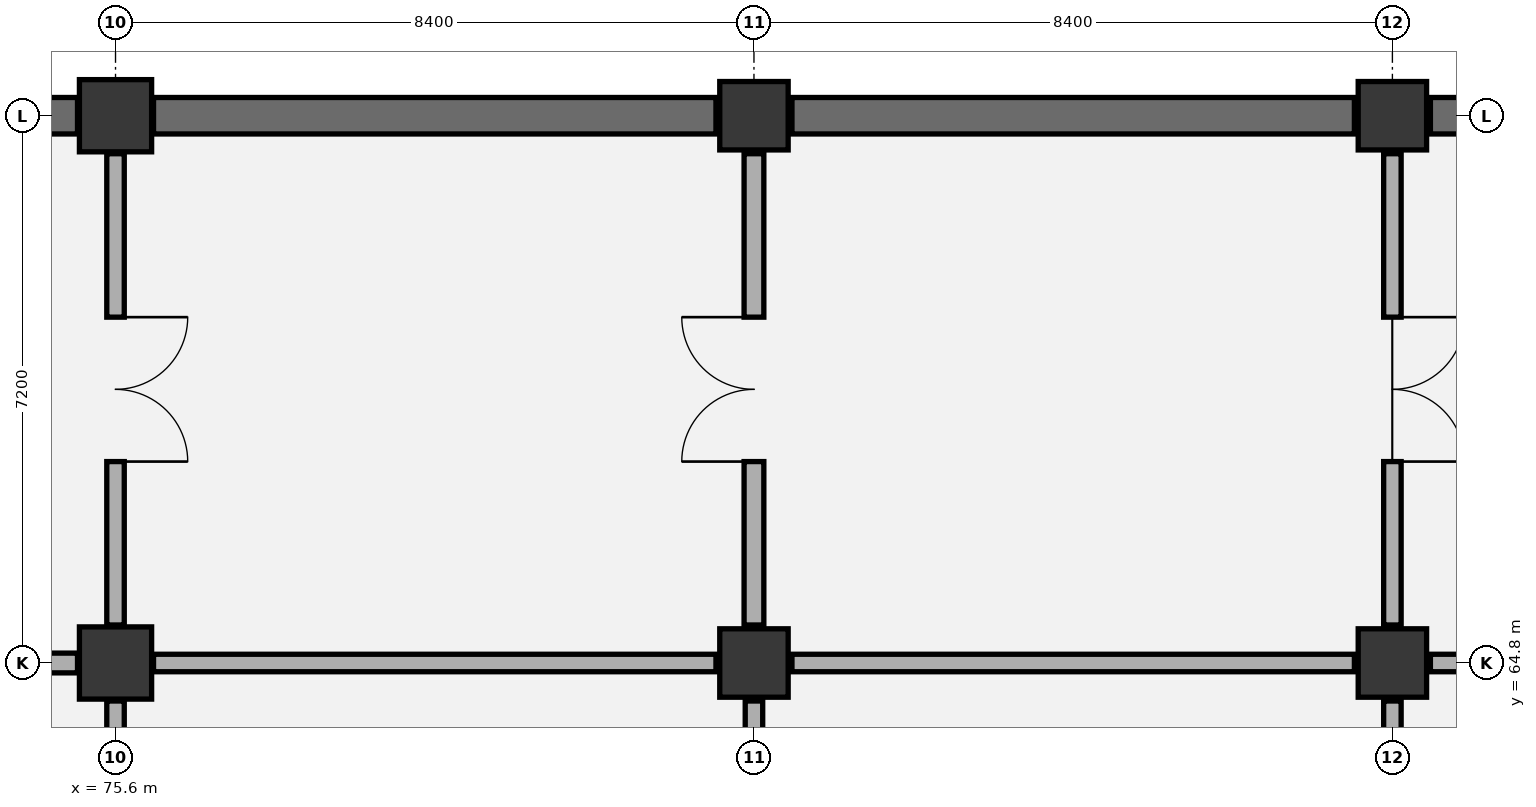
"""IFC4 building model, lengths in metres.
Left out: names, types, materials, properties, quantities, classifications, styles, units other than length and angle.
Written with IfcOpenShell. Run it as: python <this file> out.ifc"""

import sys

from ifc_helpers import new_model, si_unit, direction, frame, frame_2d, origin, origin_2d, place, context, subcontext, project, spatial, rectangle, extrude, element, fill, save


model = new_model("IFC4")
c1 = context("Model", 3, precision=1e-05, world=origin(), true_north=direction((0.0, 1.0)))
c2 = subcontext(c1, "Body", "Model", "MODEL_VIEW")
j1 = project(units=[si_unit("LENGTHUNIT", "METRE"), si_unit("PLANEANGLEUNIT", "RADIAN")], contexts=[c1])
p1 = place(None, origin())
s1 = spatial("IfcSite", under=j1, at=p1, CompositionType="ELEMENT")
p2 = place(p1, origin())
s2 = spatial("IfcBuilding", under=s1, at=p2, CompositionType="ELEMENT")
p3 = place(p2, frame((0.0, 0.0, -4.8)))
s3 = spatial("IfcBuildingStorey", under=s2, at=p3, CompositionType="ELEMENT", Elevation=-4.8)
for number, where, z_axis, x_axis in (
    (1, (75.6, 64.8, 0.0), (0.0, 0.0, 1.0), (1.0, 0.0, 0.0)),
    (2, (75.6, 72.0, 0.0), (0.0, 0.0, 1.0), (1.0, 0.0, 0.0)),
):
    element("IfcColumn", number, at=place(p3, frame(where, z_axis=z_axis, x_axis=x_axis)), inside=s3, PredefinedType="COLUMN", context=c2, shape_type="SweptSolid", body=[
        extrude(rectangle(XDim=0.95, YDim=0.95, at=origin_2d()), origin(), (0.0, 0.0, 1.0), 4.8),
    ])
for number, where, z_axis, x_axis in (
    (3, (84.0, 64.8, 0.0), (0.0, 0.0, 1.0), (1.0, 0.0, 0.0)),
    (4, (84.0, 72.0, 0.0), (0.0, 0.0, 1.0), (1.0, 0.0, 0.0)),
    (5, (92.4, 64.8, 0.0), (0.0, 0.0, 1.0), (1.0, 0.0, 0.0)),
    (6, (92.4, 72.0, 0.0), (0.0, 0.0, 1.0), (1.0, 0.0, 0.0)),
):
    element("IfcColumn", number, at=place(p3, frame(where, z_axis=z_axis, x_axis=x_axis)), inside=s3, PredefinedType="COLUMN", context=c2, shape_type="SweptSolid", body=[
        extrude(rectangle(XDim=0.9, YDim=0.9, at=origin_2d()), origin(), (0.0, 0.0, 1.0), 4.8),
    ])
p4 = place(p3, frame((67.7, 72.0, 0.0), z_axis=(0.0, 0.0, 1.0), x_axis=(1.0, 0.0, 0.0)))
e7 = element("IfcWall", 7, at=p4, inside=s3, PredefinedType="USERDEFINED", context=c2, shape_type="SweptSolid", body=[
    extrude(rectangle(XDim=7.4, YDim=0.48, at=frame_2d((3.7, 0.0))), origin(), (0.0, 0.0, 1.0), 4.45),
])
for number, where, z_axis, x_axis in (
    (8, (76.1, 72.0, 0.0), (0.0, 0.0, 1.0), (1.0, 0.0, 0.0)),
    (9, (84.5, 72.0, 0.0), (0.0, 0.0, 1.0), (1.0, 0.0, 0.0)),
):
    element("IfcWall", number, at=place(p3, frame(where, z_axis=z_axis, x_axis=x_axis)), inside=s3, PredefinedType="USERDEFINED", context=c2, shape_type="SweptSolid", body=[
        extrude(rectangle(XDim=7.4, YDim=0.48, at=frame_2d((3.7, 0.0))), origin(), (0.0, 0.0, 1.0), 4.45),
    ])
p5 = place(p3, frame((92.9, 72.0, 0.0), z_axis=(0.0, 0.0, 1.0), x_axis=(1.0, 0.0, 0.0)))
e10 = element("IfcWall", 10, at=p5, inside=s3, PredefinedType="USERDEFINED", context=c2, shape_type="SweptSolid", body=[
    extrude(rectangle(XDim=7.4, YDim=0.48, at=frame_2d((3.7, 0.0))), origin(), (0.0, 0.0, 1.0), 4.45),
])
p6 = place(p3, frame((75.6, 58.1, 0.0), z_axis=(0.0, 0.0, 1.0), x_axis=(0.0, 1.0, 0.0)))
e11 = element("IfcWall", 11, at=p6, inside=s3, PredefinedType="PARTITIONING", context=c2, shape_type="SweptSolid", body=[
    extrude(rectangle(XDim=6.2, YDim=0.23, at=frame_2d((3.1, 0.0))), origin(), (0.0, 0.0, 1.0), 3.645),
])
p7 = place(p3, frame((67.7, 64.8, 0.0), z_axis=(0.0, 0.0, 1.0), x_axis=(1.0, 0.0, 0.0)))
e12 = element("IfcWall", 12, at=p7, inside=s3, PredefinedType="PARTITIONING", context=c2, shape_type="SweptSolid", body=[
    extrude(rectangle(XDim=7.4, YDim=0.26, at=frame_2d((3.7, 0.0))), origin(), (0.0, 0.0, 1.0), 3.545),
])
p8 = place(p3, frame((75.6, 65.3, 0.0), z_axis=(0.0, 0.0, 1.0), x_axis=(0.0, 1.0, 0.0)))
e13 = element("IfcWall", 13, at=p8, inside=s3, PredefinedType="PARTITIONING", context=c2, shape_type="SweptSolid", body=[
    extrude(rectangle(XDim=6.2, YDim=0.23, at=frame_2d((3.1, 0.0))), origin(), (0.0, 0.0, 1.0), 3.645),
])
p9 = place(p8, frame((2.15, 0.0, 0.0)))
e14 = element("IfcOpeningElement", 14, at=p9, cuts=e13, PredefinedType="OPENING", context=c2, shape_type="SweptSolid", body=[
    extrude(rectangle(XDim=1.9, YDim=2.3, at=frame_2d((0.95, 1.15))), frame((0.0, 0.125, 0.0), z_axis=(0.0, -1.0, 0.0), x_axis=(1.0, 0.0, 0.0)), (0.0, 0.0, 1.0), 0.25),
])
p10 = place(p3, frame((84.0, 58.1, 0.0), z_axis=(0.0, 0.0, 1.0), x_axis=(0.0, 1.0, 0.0)))
e15 = element("IfcWall", 15, at=p10, inside=s3, PredefinedType="PARTITIONING", context=c2, shape_type="SweptSolid", body=[
    extrude(rectangle(XDim=6.2, YDim=0.23, at=frame_2d((3.1, 0.0))), origin(), (0.0, 0.0, 1.0), 3.645),
])
p11 = place(p10, frame((0.25, 0.0, 0.0)))
e16 = element("IfcOpeningElement", 16, at=p11, cuts=e15, PredefinedType="OPENING", context=c2, shape_type="SweptSolid", body=[
    extrude(rectangle(XDim=1.05, YDim=2.15, at=frame_2d((0.525, 1.075))), frame((0.0, 0.125, 0.0), z_axis=(0.0, -1.0, 0.0), x_axis=(1.0, 0.0, 0.0)), (0.0, 0.0, 1.0), 0.25),
])
p12 = place(p3, frame((76.1, 64.8, 0.0), z_axis=(0.0, 0.0, 1.0), x_axis=(1.0, 0.0, 0.0)))
e17 = element("IfcWall", 17, at=p12, inside=s3, PredefinedType="PARTITIONING", context=c2, shape_type="SweptSolid", body=[
    extrude(rectangle(XDim=7.4, YDim=0.23, at=frame_2d((3.7, 0.0))), origin(), (0.0, 0.0, 1.0), 3.545),
])
p13 = place(p3, frame((84.0, 65.3, 0.0), z_axis=(0.0, 0.0, 1.0), x_axis=(0.0, 1.0, 0.0)))
e18 = element("IfcWall", 18, at=p13, inside=s3, PredefinedType="PARTITIONING", context=c2, shape_type="SweptSolid", body=[
    extrude(rectangle(XDim=6.2, YDim=0.26, at=frame_2d((3.1, 0.0))), origin(), (0.0, 0.0, 1.0), 3.645),
])
p14 = place(p13, frame((2.15, 0.0, 0.0)))
e19 = element("IfcOpeningElement", 19, at=p14, cuts=e18, PredefinedType="OPENING", context=c2, shape_type="SweptSolid", body=[
    extrude(rectangle(XDim=1.9, YDim=2.3, at=frame_2d((0.95, 1.15))), frame((0.0, 0.14, 0.0), z_axis=(0.0, -1.0, 0.0), x_axis=(1.0, 0.0, 0.0)), (0.0, 0.0, 1.0), 0.28),
])
p15 = place(p3, frame((92.4, 58.1, 0.0), z_axis=(0.0, 0.0, 1.0), x_axis=(0.0, 1.0, 0.0)))
e20 = element("IfcWall", 20, at=p15, inside=s3, PredefinedType="PARTITIONING", context=c2, shape_type="SweptSolid", body=[
    extrude(rectangle(XDim=6.2, YDim=0.23, at=frame_2d((3.1, 0.0))), origin(), (0.0, 0.0, 1.0), 3.645),
])
p16 = place(p15, frame((0.25, 0.0, 0.0)))
e21 = element("IfcOpeningElement", 21, at=p16, cuts=e20, PredefinedType="OPENING", context=c2, shape_type="SweptSolid", body=[
    extrude(rectangle(XDim=1.05, YDim=2.15, at=frame_2d((0.525, 1.075))), frame((0.0, 0.125, 0.0), z_axis=(0.0, -1.0, 0.0), x_axis=(1.0, 0.0, 0.0)), (0.0, 0.0, 1.0), 0.25),
])
p17 = place(p3, frame((84.5, 64.8, 0.0), z_axis=(0.0, 0.0, 1.0), x_axis=(1.0, 0.0, 0.0)))
e22 = element("IfcWall", 22, at=p17, inside=s3, PredefinedType="PARTITIONING", context=c2, shape_type="SweptSolid", body=[
    extrude(rectangle(XDim=7.4, YDim=0.23, at=frame_2d((3.7, 0.0))), origin(), (0.0, 0.0, 1.0), 3.545),
])
p18 = place(p3, frame((92.4, 65.3, 0.0), z_axis=(0.0, 0.0, 1.0), x_axis=(0.0, 1.0, 0.0)))
e23 = element("IfcWall", 23, at=p18, inside=s3, PredefinedType="PARTITIONING", context=c2, shape_type="SweptSolid", body=[
    extrude(rectangle(XDim=6.2, YDim=0.23, at=frame_2d((3.1, 0.0))), origin(), (0.0, 0.0, 1.0), 3.645),
])
p19 = place(p18, frame((2.15, 0.0, 0.0)))
e24 = element("IfcOpeningElement", 24, at=p19, cuts=e23, PredefinedType="OPENING", context=c2, shape_type="SweptSolid", body=[
    extrude(rectangle(XDim=1.9, YDim=2.3, at=frame_2d((0.95, 1.15))), frame((0.0, 0.125, 0.0), z_axis=(0.0, -1.0, 0.0), x_axis=(1.0, 0.0, 0.0)), (0.0, 0.0, 1.0), 0.25),
])
p20 = place(p3, frame((92.9, 64.8, 0.0), z_axis=(0.0, 0.0, 1.0), x_axis=(1.0, 0.0, 0.0)))
e25 = element("IfcWall", 25, at=p20, inside=s3, PredefinedType="PARTITIONING", context=c2, shape_type="SweptSolid", body=[
    extrude(rectangle(XDim=7.4, YDim=0.23, at=frame_2d((3.7, 0.0))), origin(), (0.0, 0.0, 1.0), 3.545),
])
p21 = place(p9, frame((1.9, 0.0, 0.0), z_axis=(0.0, 0.0, 1.0), x_axis=(-1.0, 0.0, 0.0)))
e26 = element("IfcDoor", 26, at=p21, inside=s3, OperationType="DOUBLE_DOOR_SINGLE_SWING", PredefinedType="DOOR", context=c2, shape_type="SweptSolid", body=[
    extrude(rectangle(XDim=1.9, YDim=2.3, at=frame_2d((0.95, 1.15))), frame((0.0, 0.025, 0.0), z_axis=(0.0, -1.0, 0.0), x_axis=(1.0, 0.0, 0.0)), (0.0, 0.0, 1.0), 0.05),
])
fill(e14, e26)
p22 = place(p14, origin())
e27 = element("IfcDoor", 27, at=p22, inside=s3, OperationType="DOUBLE_DOOR_SINGLE_SWING", PredefinedType="DOOR", context=c2, shape_type="SweptSolid", body=[
    extrude(rectangle(XDim=1.9, YDim=2.3, at=frame_2d((0.95, 1.15))), frame((0.0, 0.025, 0.0), z_axis=(0.0, -1.0, 0.0), x_axis=(1.0, 0.0, 0.0)), (0.0, 0.0, 1.0), 0.05),
])
fill(e19, e27)
p23 = place(p19, frame((1.9, 0.0, 0.0), z_axis=(0.0, 0.0, 1.0), x_axis=(-1.0, 0.0, 0.0)))
e28 = element("IfcDoor", 28, at=p23, inside=s3, OperationType="DOUBLE_DOOR_SINGLE_SWING", PredefinedType="DOOR", context=c2, shape_type="SweptSolid", body=[
    extrude(rectangle(XDim=1.9, YDim=2.3, at=frame_2d((0.95, 1.15))), frame((0.0, 0.025, 0.0), z_axis=(0.0, -1.0, 0.0), x_axis=(1.0, 0.0, 0.0)), (0.0, 0.0, 1.0), 0.05),
])
fill(e24, e28)
save(model, sys.argv[1])
